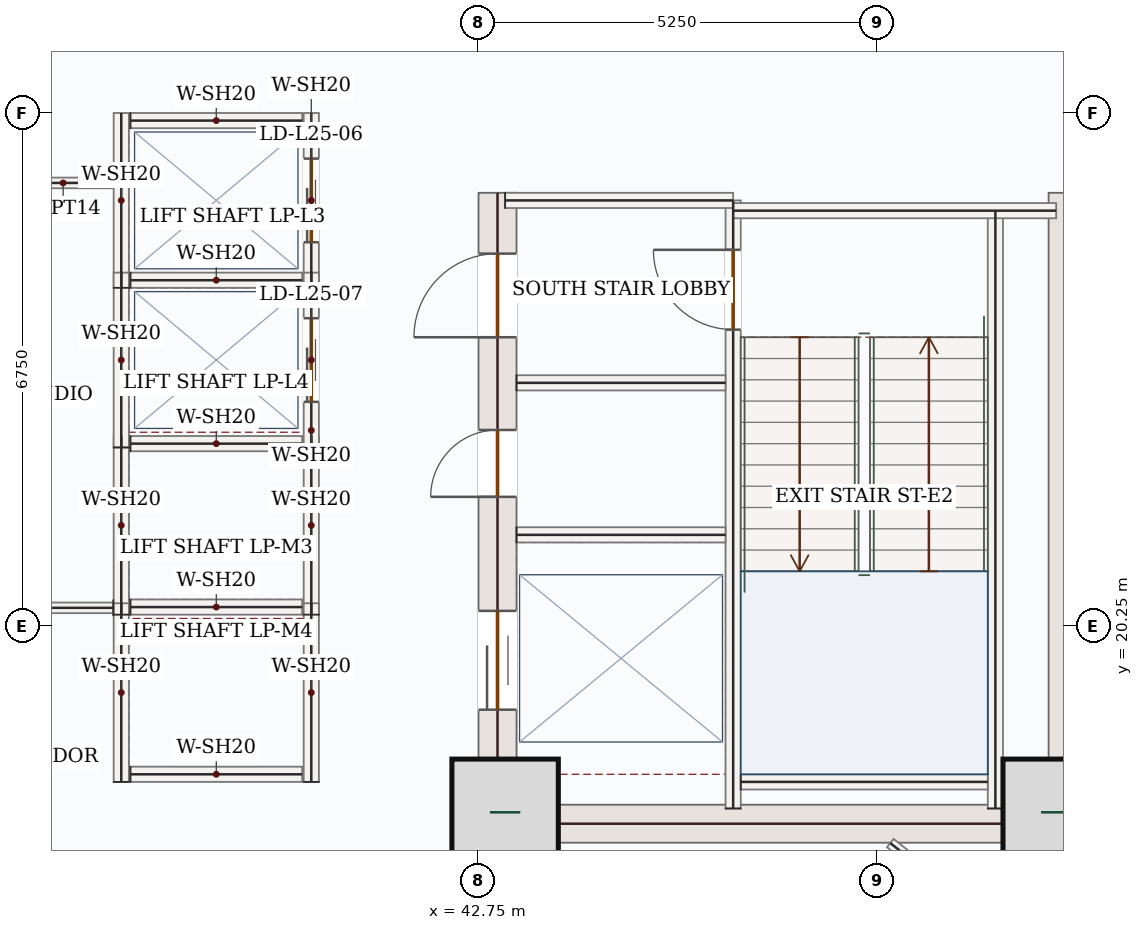
"""IFC4 building model, lengths in metres.
Left out: names, types, materials, properties, quantities, classifications, styles, units other than length and angle.
Written with IfcOpenShell. Run it as: python <this file> out.ifc"""

import sys

from ifc_helpers import new_model, si_unit, direction, frame, frame_2d, origin, origin_2d, place, context, subcontext, project, spatial, rectangle, extrude, source, transform, mapped, element, fill, save


model = new_model("IFC4")
c1 = context("Model", 3, precision=1e-05, world=origin(), true_north=direction((0.0, 1.0)))
c2 = subcontext(c1, "Body", "Model", "MODEL_VIEW")
j1 = project(units=[si_unit("LENGTHUNIT", "METRE"), si_unit("PLANEANGLEUNIT", "RADIAN")], contexts=[c1])
p1 = place(None, origin())
s1 = spatial("IfcSite", under=j1, at=p1, CompositionType="ELEMENT")
p2 = place(p1, origin())
s2 = spatial("IfcBuilding", under=s1, at=p2, CompositionType="ELEMENT")
p3 = place(p2, frame((0.0, 0.0, 113.1)))
s3 = spatial("IfcBuildingStorey", under=s2, at=p3, CompositionType="ELEMENT", Elevation=113.1)
p4 = place(p3, frame((43.0, 17.4, 0.0), z_axis=(0.0, 0.0, 1.0), x_axis=(0.0, 1.0, 0.0)))
e1 = element("IfcWall", 1, at=p4, inside=s3, PredefinedType="SHEAR", context=c2, shape_type="SweptSolid", body=[
    extrude(rectangle(XDim=8.55, YDim=0.5, at=frame_2d((4.275, 0.0))), origin(), (0.0, 0.0, 1.0), 3.95),
])
p5 = place(p4, frame((6.65, 0.0, 0.0)))
e2 = element("IfcOpeningElement", 2, at=p5, cuts=e1, PredefinedType="OPENING", context=c2, shape_type="SweptSolid", body=[
    extrude(rectangle(XDim=1.1, YDim=2.2, at=frame_2d((0.55, 1.1))), frame((0.0, 0.26, 0.0), z_axis=(0.0, -1.0, 0.0), x_axis=(1.0, 0.0, 0.0)), (0.0, 0.0, 1.0), 0.52),
])
p6 = place(p4, frame((1.75, 0.0, 0.0)))
e3 = element("IfcOpeningElement", 3, at=p6, cuts=e1, PredefinedType="OPENING", context=c2, shape_type="SweptSolid", body=[
    extrude(rectangle(XDim=1.3, YDim=2.2, at=frame_2d((0.65, 1.1))), frame((0.0, 0.26, 0.0), z_axis=(0.0, -1.0, 0.0), x_axis=(1.0, 0.0, 0.0)), (0.0, 0.0, 1.0), 0.52),
])
p7 = place(p4, frame((4.55, 0.0, 0.0)))
e4 = element("IfcOpeningElement", 4, at=p7, cuts=e1, PredefinedType="OPENING", context=c2, shape_type="SweptSolid", body=[
    extrude(rectangle(XDim=0.88, YDim=2.1, at=frame_2d((0.44, 1.05))), frame((0.0, 0.26, 0.0), z_axis=(0.0, -1.0, 0.0), x_axis=(1.0, 0.0, 0.0)), (0.0, 0.0, 1.0), 0.52),
])
m1 = source(origin(), c2, "Body", "SweptSolid", [
    extrude(rectangle(XDim=8.55, YDim=0.5, at=frame_2d((4.275, 0.0))), origin(), (0.0, 0.0, 1.0), 3.95),
])
p8 = place(p3, frame((50.5, 17.4, 0.0), z_axis=(0.0, 0.0, 1.0), x_axis=(0.0, 1.0, 0.0)))
e5 = element("IfcWall", 5, at=p8, inside=s3, PredefinedType="SHEAR", context=c2, shape_type="MappedRepresentation", body=[
    mapped(m1, transform((0.0, 0.0, 0.0), x_axis=(1.0, 0.0, 0.0), y_axis=(0.0, 1.0, 0.0), z_axis=(0.0, 0.0, 1.0), scale=1.0)),
])
m2 = source(origin(), c2, "Body", "SweptSolid", [
    extrude(rectangle(XDim=7.0, YDim=0.5, at=frame_2d((3.5, 0.0))), origin(), (0.0, 0.0, 1.0), 3.95),
])
p9 = place(p3, frame((43.25, 17.65, 0.0), z_axis=(0.0, 0.0, 1.0), x_axis=(1.0, 0.0, 0.0)))
e6 = element("IfcWall", 6, at=p9, inside=s3, PredefinedType="SHEAR", context=c2, shape_type="MappedRepresentation", body=[
    mapped(m2, transform((0.0, 0.0, 0.0), x_axis=(1.0, 0.0, 0.0), y_axis=(0.0, 1.0, 0.0), z_axis=(0.0, 0.0, 1.0), scale=1.0)),
])
m3 = source(origin(), c2, "Body", "SweptSolid", [
    extrude(rectangle(XDim=1.4, YDim=1.4, at=origin_2d()), origin(), (0.0, 0.0, 1.0), 4.2),
])
for number, where, z_axis, x_axis in (
    (7, (43.1, 17.8, 0.0), (0.0, 0.0, 1.0), (1.0, 0.0, 0.0)),
    (8, (50.35, 17.8, 0.0), (0.0, 0.0, 1.0), (1.0, 0.0, 0.0)),
):
    element("IfcColumn", number, at=place(p3, frame(where, z_axis=z_axis, x_axis=x_axis)), inside=s3, PredefinedType="COLUMN", context=c2, shape_type="MappedRepresentation", body=[
        mapped(m3, transform((0.0, 0.0, 0.0), x_axis=(1.0, 0.0, 0.0), y_axis=(0.0, 1.0, 0.0), z_axis=(0.0, 0.0, 1.0), scale=1.0)),
    ])
p10 = place(p3, frame((53.06, 18.458, 0.0), z_axis=(0.0, 0.0, 1.0), x_axis=(-0.707106781187, -0.707106781187, 0.0)))
e9 = element("IfcWall", 9, at=p10, inside=s3, PredefinedType="SOLIDWALL", context=c2, shape_type="SweptSolid", body=[
    extrude(rectangle(XDim=5.258, YDim=0.32, at=frame_2d((2.629, 0.0))), origin(), (0.0, 0.0, 1.0), 3.95),
])
p11 = place(p10, frame((1.429, 0.0, 0.85)))
e10 = element("IfcOpeningElement", 10, at=p11, cuts=e9, PredefinedType="OPENING", context=c2, shape_type="SweptSolid", body=[
    extrude(rectangle(XDim=2.4, YDim=1.8, at=frame_2d((1.2, 0.9))), frame((0.0, 0.17, 0.0), z_axis=(0.0, -1.0, 0.0), x_axis=(1.0, 0.0, 0.0)), (0.0, 0.0, 1.0), 0.34),
])
m4 = source(origin(), c2, "Body", "SweptSolid", [
    extrude(rectangle(XDim=7.87, YDim=0.2, at=frame_2d((3.935, 0.0))), origin(), (0.0, 0.0, 1.0), 3.95),
])
p12 = place(p3, frame((49.55, 17.85, 0.0), z_axis=(0.0, 0.0, 1.0), x_axis=(0.0, 1.0, 0.0)))
e11 = element("IfcWall", 11, at=p12, inside=s3, PredefinedType="SOLIDWALL", context=c2, shape_type="MappedRepresentation", body=[
    mapped(m4, transform((0.0, 0.0, 0.0), x_axis=(1.0, 0.0, 0.0), y_axis=(0.0, 1.0, 0.0), z_axis=(0.0, 0.0, 1.0), scale=1.0)),
])
p13 = place(p3, frame((46.1, 17.85, 0.0), z_axis=(0.0, 0.0, 1.0), x_axis=(0.0, 1.0, 0.0)))
e12 = element("IfcWall", 12, at=p13, inside=s3, PredefinedType="SOLIDWALL", context=c2, shape_type="SweptSolid", body=[
    extrude(rectangle(XDim=8.0, YDim=0.2, at=frame_2d((4.0, 0.0))), origin(), (0.0, 0.0, 1.0), 3.95),
])
p14 = place(p13, frame((6.3, 0.0, 0.0)))
e13 = element("IfcOpeningElement", 13, at=p14, cuts=e12, PredefinedType="OPENING", context=c2, shape_type="SweptSolid", body=[
    extrude(rectangle(XDim=1.05, YDim=2.15, at=frame_2d((0.525, 1.075))), frame((0.0, 0.11, 0.0), z_axis=(0.0, -1.0, 0.0), x_axis=(1.0, 0.0, 0.0)), (0.0, 0.0, 1.0), 0.22),
])
m5 = source(origin(), c2, "Body", "SweptSolid", [
    extrude(rectangle(XDim=3.0, YDim=0.2, at=frame_2d((1.5, 0.0))), origin(), (0.0, 0.0, 1.0), 3.95),
])
p15 = place(p3, frame((43.1, 25.85, 0.0), z_axis=(0.0, 0.0, 1.0), x_axis=(1.0, 0.0, 0.0)))
e14 = element("IfcWall", 14, at=p15, inside=s3, PredefinedType="SOLIDWALL", context=c2, shape_type="MappedRepresentation", body=[
    mapped(m5, transform((0.0, 0.0, 0.0), x_axis=(1.0, 0.0, 0.0), y_axis=(0.0, 1.0, 0.0), z_axis=(0.0, 0.0, 1.0), scale=1.0)),
])
m6 = source(origin(), c2, "Body", "SweptSolid", [
    extrude(rectangle(XDim=4.25, YDim=0.2, at=frame_2d((2.125, 0.0))), origin(), (0.0, 0.0, 1.0), 3.95),
])
p16 = place(p3, frame((46.1, 25.715, 0.0), z_axis=(0.0, 0.0, 1.0), x_axis=(1.0, 0.0, 0.0)))
e15 = element("IfcWall", 15, at=p16, inside=s3, PredefinedType="SOLIDWALL", context=c2, shape_type="MappedRepresentation", body=[
    mapped(m6, transform((0.0, 0.0, 0.0), x_axis=(1.0, 0.0, 0.0), y_axis=(0.0, 1.0, 0.0), z_axis=(0.0, 0.0, 1.0), scale=1.0)),
])
m7 = source(origin(), c2, "Body", "SweptSolid", [
    extrude(rectangle(XDim=3.25, YDim=0.2, at=frame_2d((1.625, 0.0))), origin(), (0.0, 0.0, 1.0), 3.95),
])
p17 = place(p3, frame((46.2, 18.2, 0.0), z_axis=(0.0, 0.0, 1.0), x_axis=(1.0, 0.0, 0.0)))
e16 = element("IfcWall", 16, at=p17, inside=s3, PredefinedType="SOLIDWALL", context=c2, shape_type="MappedRepresentation", body=[
    mapped(m7, transform((0.0, 0.0, 0.0), x_axis=(1.0, 0.0, 0.0), y_axis=(0.0, 1.0, 0.0), z_axis=(0.0, 0.0, 1.0), scale=1.0)),
])
m8 = source(origin(), c2, "Body", "SweptSolid", [
    extrude(rectangle(XDim=2.75, YDim=0.2, at=frame_2d((1.375, 0.0))), origin(), (0.0, 0.0, 1.0), 3.95),
])
for number, where, z_axis, x_axis in (
    (17, (43.25, 23.45, 0.0), (0.0, 0.0, 1.0), (1.0, 0.0, 0.0)),
    (18, (43.25, 21.45, 0.0), (0.0, 0.0, 1.0), (1.0, 0.0, 0.0)),
):
    element("IfcWall", number, at=place(p3, frame(where, z_axis=z_axis, x_axis=x_axis)), inside=s3, PredefinedType="SOLIDWALL", context=c2, shape_type="MappedRepresentation", body=[
        mapped(m8, transform((0.0, 0.0, 0.0), x_axis=(1.0, 0.0, 0.0), y_axis=(0.0, 1.0, 0.0), z_axis=(0.0, 0.0, 1.0), scale=1.0)),
    ])
m9 = source(origin(), c2, "Body", "SweptSolid", [
    extrude(rectangle(XDim=2.35, YDim=0.2, at=frame_2d((1.175, 0.0))), origin(), (0.0, 0.0, 1.0), 3.95),
])
for number, where, z_axis, x_axis in (
    (19, (38.05, 20.4, 0.0), (0.0, 0.0, 1.0), (0.0, 1.0, 0.0)),
    (20, (40.55, 20.4, 0.0), (0.0, 0.0, 1.0), (0.0, 1.0, 0.0)),
):
    element("IfcWall", number, at=place(p3, frame(where, z_axis=z_axis, x_axis=x_axis)), inside=s3, PredefinedType="SOLIDWALL", context=c2, shape_type="MappedRepresentation", body=[
        mapped(m9, transform((0.0, 0.0, 0.0), x_axis=(1.0, 0.0, 0.0), y_axis=(0.0, 1.0, 0.0), z_axis=(0.0, 0.0, 1.0), scale=1.0)),
    ])
m10 = source(origin(), c2, "Body", "SweptSolid", [
    extrude(rectangle(XDim=2.26, YDim=0.2, at=frame_2d((1.13, 0.0))), origin(), (0.0, 0.0, 1.0), 3.95),
])
for number, where, z_axis, x_axis in (
    (21, (38.17, 20.5, 0.0), (0.0, 0.0, 1.0), (1.0, 0.0, 0.0)),
    (22, (38.17, 22.65, 0.0), (0.0, 0.0, 1.0), (1.0, 0.0, 0.0)),
):
    element("IfcWall", number, at=place(p3, frame(where, z_axis=z_axis, x_axis=x_axis)), inside=s3, PredefinedType="SOLIDWALL", context=c2, shape_type="MappedRepresentation", body=[
        mapped(m10, transform((0.0, 0.0, 0.0), x_axis=(1.0, 0.0, 0.0), y_axis=(0.0, 1.0, 0.0), z_axis=(0.0, 0.0, 1.0), scale=1.0)),
    ])
for number, where, z_axis, x_axis in (
    (23, (38.05, 18.2, 0.0), (0.0, 0.0, 1.0), (0.0, 1.0, 0.0)),
    (24, (40.55, 18.2, 0.0), (0.0, 0.0, 1.0), (0.0, 1.0, 0.0)),
):
    element("IfcWall", number, at=place(p3, frame(where, z_axis=z_axis, x_axis=x_axis)), inside=s3, PredefinedType="SOLIDWALL", context=c2, shape_type="MappedRepresentation", body=[
        mapped(m9, transform((0.0, 0.0, 0.0), x_axis=(1.0, 0.0, 0.0), y_axis=(0.0, 1.0, 0.0), z_axis=(0.0, 0.0, 1.0), scale=1.0)),
    ])
p18 = place(p3, frame((38.17, 18.3, 0.0), z_axis=(0.0, 0.0, 1.0), x_axis=(1.0, 0.0, 0.0)))
e25 = element("IfcWall", 25, at=p18, inside=s3, PredefinedType="SOLIDWALL", context=c2, shape_type="MappedRepresentation", body=[
    mapped(m10, transform((0.0, 0.0, 0.0), x_axis=(1.0, 0.0, 0.0), y_axis=(0.0, 1.0, 0.0), z_axis=(0.0, 0.0, 1.0), scale=1.0)),
])
m11 = source(origin(), c2, "Body", "SweptSolid", [
    extrude(rectangle(XDim=2.3, YDim=0.2, at=frame_2d((1.15, 0.0))), origin(), (0.0, 0.0, 1.0), 3.95),
])
p19 = place(p3, frame((38.05, 24.7, 0.0), z_axis=(0.0, 0.0, 1.0), x_axis=(0.0, 1.0, 0.0)))
e26 = element("IfcWall", 26, at=p19, inside=s3, PredefinedType="SOLIDWALL", context=c2, shape_type="MappedRepresentation", body=[
    mapped(m11, transform((0.0, 0.0, 0.0), x_axis=(1.0, 0.0, 0.0), y_axis=(0.0, 1.0, 0.0), z_axis=(0.0, 0.0, 1.0), scale=1.0)),
])
p20 = place(p3, frame((40.55, 24.7, 0.0), z_axis=(0.0, 0.0, 1.0), x_axis=(0.0, 1.0, 0.0)))
e27 = element("IfcWall", 27, at=p20, inside=s3, PredefinedType="SOLIDWALL", context=c2, shape_type="SweptSolid", body=[
    extrude(rectangle(XDim=2.3, YDim=0.2, at=frame_2d((1.15, 0.0))), origin(), (0.0, 0.0, 1.0), 3.95),
])
p21 = place(p20, frame((0.6, 0.0, 0.0)))
e28 = element("IfcOpeningElement", 28, at=p21, cuts=e27, PredefinedType="OPENING", context=c2, shape_type="SweptSolid", body=[
    extrude(rectangle(XDim=1.1, YDim=2.15, at=frame_2d((0.55, 1.075))), frame((0.0, 0.11, 0.0), z_axis=(0.0, -1.0, 0.0), x_axis=(1.0, 0.0, 0.0)), (0.0, 0.0, 1.0), 0.22),
])
for number, where, z_axis, x_axis in (
    (29, (38.17, 24.8, 0.0), (0.0, 0.0, 1.0), (1.0, 0.0, 0.0)),
    (30, (38.17, 26.9, 0.0), (0.0, 0.0, 1.0), (1.0, 0.0, 0.0)),
):
    element("IfcWall", number, at=place(p3, frame(where, z_axis=z_axis, x_axis=x_axis)), inside=s3, PredefinedType="SOLIDWALL", context=c2, shape_type="MappedRepresentation", body=[
        mapped(m10, transform((0.0, 0.0, 0.0), x_axis=(1.0, 0.0, 0.0), y_axis=(0.0, 1.0, 0.0), z_axis=(0.0, 0.0, 1.0), scale=1.0)),
    ])
m12 = source(origin(), c2, "Body", "SweptSolid", [
    extrude(rectangle(XDim=2.3, YDim=0.2, at=frame_2d((1.15, 0.0))), origin(), (0.0, 0.0, 1.0), 3.95),
])
p22 = place(p3, frame((38.05, 22.6, 0.0), z_axis=(0.0, 0.0, 1.0), x_axis=(0.0, 1.0, 0.0)))
e31 = element("IfcWall", 31, at=p22, inside=s3, PredefinedType="SOLIDWALL", context=c2, shape_type="MappedRepresentation", body=[
    mapped(m12, transform((0.0, 0.0, 0.0), x_axis=(1.0, 0.0, 0.0), y_axis=(0.0, 1.0, 0.0), z_axis=(0.0, 0.0, 1.0), scale=1.0)),
])
p23 = place(p3, frame((40.55, 22.6, 0.0), z_axis=(0.0, 0.0, 1.0), x_axis=(0.0, 1.0, 0.0)))
e32 = element("IfcWall", 32, at=p23, inside=s3, PredefinedType="SOLIDWALL", context=c2, shape_type="SweptSolid", body=[
    extrude(rectangle(XDim=2.3, YDim=0.2, at=frame_2d((1.15, 0.0))), origin(), (0.0, 0.0, 1.0), 3.95),
])
p24 = place(p23, frame((0.6, 0.0, 0.0)))
e33 = element("IfcOpeningElement", 33, at=p24, cuts=e32, PredefinedType="OPENING", context=c2, shape_type="SweptSolid", body=[
    extrude(rectangle(XDim=1.1, YDim=2.15, at=frame_2d((0.55, 1.075))), frame((0.0, 0.11, 0.0), z_axis=(0.0, -1.0, 0.0), x_axis=(1.0, 0.0, 0.0)), (0.0, 0.0, 1.0), 0.22),
])
p25 = place(p3, frame((34.055, 26.08, 0.0), z_axis=(0.0, 0.0, 1.0), x_axis=(1.0, 0.0, 0.0)))
e34 = element("IfcWall", 34, at=p25, inside=s3, PredefinedType="PARTITIONING", context=c2, shape_type="SweptSolid", body=[
    extrude(rectangle(XDim=3.89, YDim=0.14, at=frame_2d((1.945, 0.0))), origin(), (0.0, 0.0, 1.0), 3.95),
])
p26 = place(p25, frame((1.47, 0.0, 0.0)))
e35 = element("IfcOpeningElement", 35, at=p26, cuts=e34, PredefinedType="OPENING", context=c2, shape_type="SweptSolid", body=[
    extrude(rectangle(XDim=0.95, YDim=2.15, at=frame_2d((0.475, 1.075))), frame((0.0, 0.08, 0.0), z_axis=(0.0, -1.0, 0.0), x_axis=(1.0, 0.0, 0.0)), (0.0, 0.0, 1.0), 0.16),
])
m13 = source(origin(), c2, "Body", "SweptSolid", [
    extrude(rectangle(XDim=3.89, YDim=0.14, at=frame_2d((1.945, 0.0))), origin(), (0.0, 0.0, 1.0), 3.95),
])
p27 = place(p3, frame((37.945, 20.49, 0.0), z_axis=(0.0, 0.0, 1.0), x_axis=(-1.0, 0.0, 0.0)))
e36 = element("IfcWall", 36, at=p27, inside=s3, PredefinedType="PARTITIONING", context=c2, shape_type="MappedRepresentation", body=[
    mapped(m13, transform((0.0, 0.0, 0.0), x_axis=(1.0, 0.0, 0.0), y_axis=(0.0, 1.0, 0.0), z_axis=(0.0, 0.0, 1.0), scale=1.0)),
])
m14 = source(origin(), c2, "Body", "SweptSolid", [
    extrude(rectangle(XDim=2.56, YDim=0.14, at=frame_2d((1.28, 0.0))), origin(), (0.0, 0.0, 1.0), 3.95),
])
p28 = place(p3, frame((50.173, 15.804, 0.0), z_axis=(0.0, 0.0, 1.0), x_axis=(-0.783347138409, 0.621584475954, 0.0)))
e37 = element("IfcWall", 37, at=p28, inside=s3, PredefinedType="PARTITIONING", context=c2, shape_type="MappedRepresentation", body=[
    mapped(m14, transform((0.0, 0.0, 0.0), x_axis=(1.0, 0.0, 0.0), y_axis=(0.0, 1.0, 0.0), z_axis=(0.0, 0.0, 1.0), scale=1.0)),
])
m15 = source(origin(), c2, "Body", "SweptSolid", [
    extrude(rectangle(XDim=2.4, YDim=1.8, at=frame_2d((1.2, 0.9))), frame((0.0, 0.03, 0.0), z_axis=(0.0, -1.0, 0.0), x_axis=(1.0, 0.0, 0.0)), (0.0, 0.0, 1.0), 0.06),
])
p29 = place(p11, origin())
e38 = element("IfcWindow", 38, at=p29, inside=s3, PartitioningType="DOUBLE_PANEL_VERTICAL", PredefinedType="WINDOW", context=c2, shape_type="MappedRepresentation", body=[
    mapped(m15, transform((0.0, 0.0, 0.0), x_axis=(1.0, 0.0, 0.0), y_axis=(0.0, 1.0, 0.0), z_axis=(0.0, 0.0, 1.0), scale=1.0)),
])
fill(e10, e38)
m16 = source(origin(), c2, "Body", "SweptSolid", [
    extrude(rectangle(XDim=1.05, YDim=2.15, at=frame_2d((0.525, 1.075))), frame((0.0, 0.025, 0.0), z_axis=(0.0, -1.0, 0.0), x_axis=(1.0, 0.0, 0.0)), (0.0, 0.0, 1.0), 0.05),
])
p30 = place(p14, origin())
e39 = element("IfcDoor", 39, at=p30, inside=s3, OperationType="SINGLE_SWING_RIGHT", PredefinedType="DOOR", context=c2, shape_type="MappedRepresentation", body=[
    mapped(m16, transform((0.0, 0.0, 0.0), x_axis=(1.0, 0.0, 0.0), y_axis=(0.0, 1.0, 0.0), z_axis=(0.0, 0.0, 1.0), scale=1.0)),
])
fill(e13, e39)
m17 = source(origin(), c2, "Body", "SweptSolid", [
    extrude(rectangle(XDim=1.1, YDim=2.2, at=frame_2d((0.55, 1.1))), frame((0.0, 0.025, 0.0), z_axis=(0.0, -1.0, 0.0), x_axis=(1.0, 0.0, 0.0)), (0.0, 0.0, 1.0), 0.05),
])
p31 = place(p5, origin())
e40 = element("IfcDoor", 40, at=p31, inside=s3, OperationType="SINGLE_SWING_LEFT", PredefinedType="DOOR", context=c2, shape_type="MappedRepresentation", body=[
    mapped(m17, transform((0.0, 0.0, 0.0), x_axis=(1.0, 0.0, 0.0), y_axis=(0.0, 1.0, 0.0), z_axis=(0.0, 0.0, 1.0), scale=1.0)),
])
fill(e2, e40)
m18 = source(origin(), c2, "Body", "SweptSolid", [
    extrude(rectangle(XDim=1.3, YDim=2.2, at=frame_2d((0.65, 1.1))), frame((0.0, 0.025, 0.0), z_axis=(0.0, -1.0, 0.0), x_axis=(1.0, 0.0, 0.0)), (0.0, 0.0, 1.0), 0.05),
])
p32 = place(p6, origin())
e41 = element("IfcDoor", 41, at=p32, inside=s3, OperationType="DOUBLE_DOOR_SLIDING", PredefinedType="DOOR", context=c2, shape_type="MappedRepresentation", body=[
    mapped(m18, transform((0.0, 0.0, 0.0), x_axis=(1.0, 0.0, 0.0), y_axis=(0.0, 1.0, 0.0), z_axis=(0.0, 0.0, 1.0), scale=1.0)),
])
fill(e3, e41)
m19 = source(origin(), c2, "Body", "SweptSolid", [
    extrude(rectangle(XDim=0.88, YDim=2.1, at=frame_2d((0.44, 1.05))), frame((0.0, 0.025, 0.0), z_axis=(0.0, -1.0, 0.0), x_axis=(1.0, 0.0, 0.0)), (0.0, 0.0, 1.0), 0.05),
])
p33 = place(p7, origin())
e42 = element("IfcDoor", 42, at=p33, inside=s3, OperationType="SINGLE_SWING_LEFT", PredefinedType="DOOR", context=c2, shape_type="MappedRepresentation", body=[
    mapped(m19, transform((0.0, 0.0, 0.0), x_axis=(1.0, 0.0, 0.0), y_axis=(0.0, 1.0, 0.0), z_axis=(0.0, 0.0, 1.0), scale=1.0)),
])
fill(e4, e42)
m20 = source(origin(), c2, "Body", "SweptSolid", [
    extrude(rectangle(XDim=1.1, YDim=2.15, at=frame_2d((0.55, 1.075))), frame((0.0, 0.025, 0.0), z_axis=(0.0, -1.0, 0.0), x_axis=(1.0, 0.0, 0.0)), (0.0, 0.0, 1.0), 0.05),
])
p34 = place(p21, origin())
e43 = element("IfcDoor", 43, at=p34, inside=s3, OperationType="DOUBLE_DOOR_SLIDING", PredefinedType="DOOR", context=c2, shape_type="MappedRepresentation", body=[
    mapped(m20, transform((0.0, 0.0, 0.0), x_axis=(1.0, 0.0, 0.0), y_axis=(0.0, 1.0, 0.0), z_axis=(0.0, 0.0, 1.0), scale=1.0)),
])
fill(e28, e43)
p35 = place(p24, origin())
e44 = element("IfcDoor", 44, at=p35, inside=s3, OperationType="DOUBLE_DOOR_SLIDING", PredefinedType="DOOR", context=c2, shape_type="MappedRepresentation", body=[
    mapped(m20, transform((0.0, 0.0, 0.0), x_axis=(1.0, 0.0, 0.0), y_axis=(0.0, 1.0, 0.0), z_axis=(0.0, 0.0, 1.0), scale=1.0)),
])
fill(e33, e44)
save(model, sys.argv[1])
